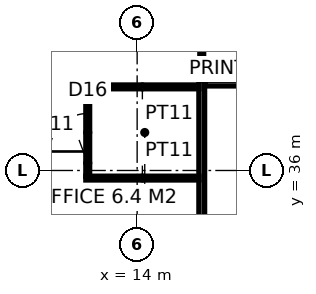
"""IFC4 building model, lengths in metres.
Left out: names, types, materials, properties, quantities, classifications, styles, units other than length and angle.
Written with IfcOpenShell. Run it as: python <this file> out.ifc"""

import sys

from ifc_helpers import new_model, si_unit, direction, frame, frame_2d, origin, place, context, subcontext, project, spatial, rectangle, extrude, element, fill, save


model = new_model("IFC4")
c1 = context("Model", 3, precision=1e-05, world=origin(), true_north=direction((0.0, 1.0)))
c2 = subcontext(c1, "Body", "Model", "MODEL_VIEW")
j1 = project(units=[si_unit("LENGTHUNIT", "METRE"), si_unit("PLANEANGLEUNIT", "RADIAN")], contexts=[c1])
p1 = place(None, origin())
s1 = spatial("IfcSite", under=j1, at=p1, CompositionType="ELEMENT")
p2 = place(p1, origin())
s2 = spatial("IfcBuilding", under=s1, at=p2, CompositionType="ELEMENT")
p3 = place(p2, frame((0.0, 0.0, 238.2)))
s3 = spatial("IfcBuildingStorey", under=s2, at=p3, CompositionType="ELEMENT", Elevation=238.2)
p4 = place(p3, frame((15.7, 15.025, 0.0), z_axis=(0.0, 0.0, 1.0), x_axis=(0.0, 1.0, 0.0)))
e1 = element("IfcWall", 1, at=p4, inside=s3, PredefinedType="PARTITIONING", context=c2, shape_type="SweptSolid", body=[
    extrude(rectangle(XDim=23.35, YDim=0.15, at=frame_2d((11.675, 0.0))), origin(), (0.0, 0.0, 1.0), 3.85),
])
p5 = place(p4, frame((3.374, 0.0, 0.0)))
e2 = element("IfcOpeningElement", 2, at=p5, cuts=e1, PredefinedType="OPENING", context=c2, shape_type="SweptSolid", body=[
    extrude(rectangle(XDim=1.8, YDim=2.4, at=frame_2d((0.9, 1.2))), frame((0.0, 0.085, 0.0), z_axis=(0.0, -1.0, 0.0), x_axis=(1.0, 0.0, 0.0)), (0.0, 0.0, 1.0), 0.17),
])
p6 = place(p4, frame((17.476, 0.0, 0.0)))
e3 = element("IfcOpeningElement", 3, at=p6, cuts=e1, PredefinedType="OPENING", context=c2, shape_type="SweptSolid", body=[
    extrude(rectangle(XDim=1.8, YDim=2.4, at=frame_2d((0.9, 1.2))), frame((0.0, 0.085, 0.0), z_axis=(0.0, -1.0, 0.0), x_axis=(1.0, 0.0, 0.0)), (0.0, 0.0, 1.0), 0.17),
])
p7 = place(p4, frame((10.475, 0.0, 0.0)))
e4 = element("IfcOpeningElement", 4, at=p7, cuts=e1, PredefinedType="OPENING", context=c2, shape_type="SweptSolid", body=[
    extrude(rectangle(XDim=1.0, YDim=2.2, at=frame_2d((0.5, 1.1))), frame((0.0, 0.085, 0.0), z_axis=(0.0, -1.0, 0.0), x_axis=(1.0, 0.0, 0.0)), (0.0, 0.0, 1.0), 0.17),
])
p8 = place(p3, frame((15.775, 38.3, 0.0), z_axis=(0.0, 0.0, 1.0), x_axis=(1.0, 0.0, 0.0)))
e5 = element("IfcWall", 5, at=p8, inside=s3, PredefinedType="PARTITIONING", context=c2, shape_type="SweptSolid", body=[
    extrude(rectangle(XDim=22.65, YDim=0.15, at=frame_2d((11.325, 0.0))), origin(), (0.0, 0.0, 1.0), 3.85),
])
p9 = place(p8, frame((7.975, 0.0, 0.0)))
e6 = element("IfcOpeningElement", 6, at=p9, cuts=e5, PredefinedType="OPENING", context=c2, shape_type="SweptSolid", body=[
    extrude(rectangle(XDim=0.9, YDim=2.1, at=frame_2d((0.45, 1.05))), frame((0.0, 0.085, 0.0), z_axis=(0.0, -1.0, 0.0), x_axis=(1.0, 0.0, 0.0)), (0.0, 0.0, 1.0), 0.17),
])
p10 = place(p8, frame((11.725, 0.0, 0.0)))
e7 = element("IfcOpeningElement", 7, at=p10, cuts=e5, PredefinedType="OPENING", context=c2, shape_type="SweptSolid", body=[
    extrude(rectangle(XDim=1.0, YDim=2.1, at=frame_2d((0.5, 1.05))), frame((0.0, 0.085, 0.0), z_axis=(0.0, -1.0, 0.0), x_axis=(1.0, 0.0, 0.0)), (0.0, 0.0, 1.0), 0.17),
])
p11 = place(p8, frame((15.575, 0.0, 0.0)))
e8 = element("IfcOpeningElement", 8, at=p11, cuts=e5, PredefinedType="OPENING", context=c2, shape_type="SweptSolid", body=[
    extrude(rectangle(XDim=0.9, YDim=2.1, at=frame_2d((0.45, 1.05))), frame((0.0, 0.085, 0.0), z_axis=(0.0, -1.0, 0.0), x_axis=(1.0, 0.0, 0.0)), (0.0, 0.0, 1.0), 0.17),
])
p12 = place(p3, frame((12.65, 35.8, 0.0), z_axis=(0.0, 0.0, 1.0), x_axis=(1.0, 0.0, 0.0)))
e9 = element("IfcWall", 9, at=p12, inside=s3, PredefinedType="PARTITIONING", context=c2, shape_type="SweptSolid", body=[
    extrude(rectangle(XDim=2.975, YDim=0.1, at=frame_2d((1.488, 0.0))), origin(), (0.0, 0.0, 1.0), 2.85),
])
p13 = place(p3, frame((12.65, 38.2, 0.0), z_axis=(0.0, 0.0, 1.0), x_axis=(1.0, 0.0, 0.0)))
e10 = element("IfcWall", 10, at=p13, inside=s3, PredefinedType="PARTITIONING", context=c2, shape_type="SweptSolid", body=[
    extrude(rectangle(XDim=2.975, YDim=0.1, at=frame_2d((1.488, 0.0))), origin(), (0.0, 0.0, 1.0), 3.85),
])
p14 = place(p3, frame((12.7, 35.85, 0.0), z_axis=(0.0, 0.0, 1.0), x_axis=(0.0, 1.0, 0.0)))
e11 = element("IfcWall", 11, at=p14, inside=s3, PredefinedType="PARTITIONING", context=c2, shape_type="SweptSolid", body=[
    extrude(rectangle(XDim=2.3, YDim=0.1, at=frame_2d((1.15, 0.0))), origin(), (0.0, 0.0, 1.0), 3.85),
])
p15 = place(p14, frame((0.65, 0.0, 0.0)))
e12 = element("IfcOpeningElement", 12, at=p15, cuts=e11, PredefinedType="OPENING", context=c2, shape_type="SweptSolid", body=[
    extrude(rectangle(XDim=1.0, YDim=2.2, at=frame_2d((0.5, 1.1))), frame((0.0, 0.06, 0.0), z_axis=(0.0, -1.0, 0.0), x_axis=(1.0, 0.0, 0.0)), (0.0, 0.0, 1.0), 0.12),
])
p16 = place(p3, frame((15.7, 38.375, 0.0), z_axis=(0.0, 0.0, 1.0), x_axis=(0.0, 1.0, 0.0)))
e13 = element("IfcWall", 13, at=p16, inside=s3, PredefinedType="PARTITIONING", context=c2, shape_type="SweptSolid", body=[
    extrude(rectangle(XDim=2.875, YDim=0.1, at=frame_2d((1.438, 0.0))), origin(), (0.0, 0.0, 1.0), 3.85),
])
p17 = place(p15, origin())
e14 = element("IfcDoor", 14, at=p17, inside=s3, OperationType="SINGLE_SWING_LEFT", PredefinedType="DOOR", context=c2, shape_type="SweptSolid", body=[
    extrude(rectangle(XDim=1.0, YDim=2.2, at=frame_2d((0.5, 1.1))), frame((0.0, 0.025, 0.0), z_axis=(0.0, -1.0, 0.0), x_axis=(1.0, 0.0, 0.0)), (0.0, 0.0, 1.0), 0.05),
])
fill(e12, e14)
save(model, sys.argv[1])
